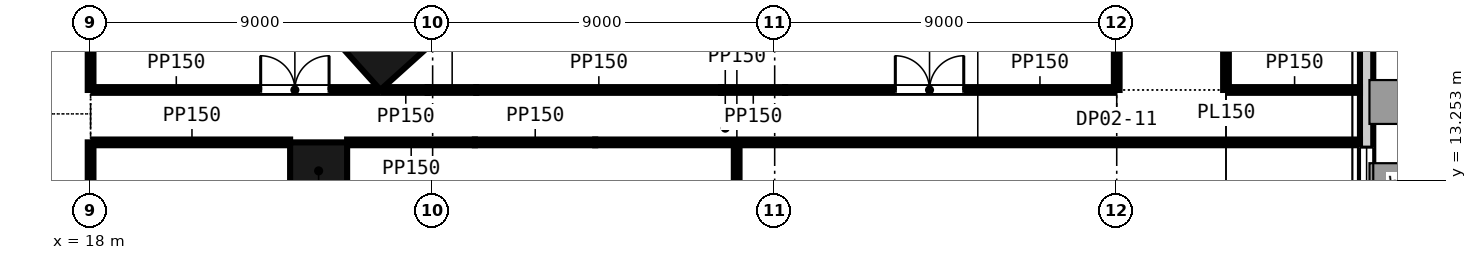
"""IFC4 building model, lengths in metres.
Left out: names, types, materials, properties, quantities, classifications, styles, units other than length and angle.
Written with IfcOpenShell. Run it as: python <this file> out.ifc"""

import sys

from ifc_helpers import new_model, si_unit, direction, frame, frame_2d, origin, origin_2d, place, context, subcontext, project, spatial, rectangle, extrude, element, fill, save


model = new_model("IFC4")
c1 = context("Model", 3, precision=1e-05, world=origin(), true_north=direction((0.0, 1.0)))
c2 = subcontext(c1, "Body", "Model", "MODEL_VIEW")
j1 = project(units=[si_unit("LENGTHUNIT", "METRE"), si_unit("PLANEANGLEUNIT", "RADIAN")], contexts=[c1])
p1 = place(None, origin())
s1 = spatial("IfcSite", under=j1, at=p1, CompositionType="ELEMENT")
p2 = place(p1, origin())
s2 = spatial("IfcBuilding", under=s1, at=p2, CompositionType="ELEMENT")
p3 = place(p2, frame((0.0, 0.0, 18.0)))
s3 = spatial("IfcBuildingStorey", under=s2, at=p3, CompositionType="ELEMENT", Elevation=18.0)
p4 = place(p3, frame((25.691, 16.9, -0.4), z_axis=(0.0, 0.0, 1.0), x_axis=(-0.669130606359, 0.743144825477, 0.0)))
e1 = element("IfcColumn", 1, at=p4, inside=s3, PredefinedType="COLUMN", context=c2, shape_type="SweptSolid", body=[
    extrude(rectangle(XDim=1.8, YDim=1.8, at=origin_2d()), origin(), (0.0, 0.0, 1.0), 4.6),
])
p5 = place(p3, frame((24.0, 13.5, -0.4), z_axis=(0.0, 0.0, 1.0), x_axis=(1.0, 0.0, 0.0)))
e2 = element("IfcColumn", 2, at=p5, inside=s3, PredefinedType="COLUMN", context=c2, shape_type="SweptSolid", body=[
    extrude(rectangle(XDim=1.5, YDim=1.5, at=origin_2d()), origin(), (0.0, 0.0, 1.0), 4.6),
])
p6 = place(p3, frame((51.575, 9.25, -0.4), z_axis=(0.0, 0.0, 1.0), x_axis=(0.0, 1.0, 0.0)))
e3 = element("IfcWall", 3, at=p6, inside=s3, PredefinedType="SOLIDWALL", context=c2, shape_type="SweptSolid", body=[
    extrude(rectangle(XDim=7.75, YDim=0.35, at=frame_2d((3.875, 0.0))), origin(), (0.0, 0.0, 1.0), 3.7),
])
p7 = place(p6, frame((2.875, 0.0, 1.3)))
e4 = element("IfcOpeningElement", 4, at=p7, cuts=e3, PredefinedType="OPENING", context=c2, shape_type="SweptSolid", body=[
    extrude(rectangle(XDim=2.0, YDim=2.35, at=frame_2d((1.0, 1.175))), frame((0.0, 0.185, 0.0), z_axis=(0.0, -1.0, 0.0), x_axis=(1.0, 0.0, 0.0)), (0.0, 0.0, 1.0), 0.37),
])
p8 = place(p3, frame((18.075, 14.25, 0.0), z_axis=(0.0, 0.0, 1.0), x_axis=(1.0, 0.0, 0.0)))
e5 = element("IfcWall", 5, at=p8, inside=s3, PredefinedType="PARTITIONING", context=c2, shape_type="SweptSolid", body=[
    extrude(rectangle(XDim=5.175, YDim=0.15, at=frame_2d((2.587, 0.0))), origin(), (0.0, 0.0, 1.0), 4.2),
])
p9 = place(p3, frame((24.75, 14.25, 0.0), z_axis=(0.0, 0.0, 1.0), x_axis=(1.0, 0.0, 0.0)))
e6 = element("IfcWall", 6, at=p9, inside=s3, PredefinedType="PARTITIONING", context=c2, shape_type="SweptSolid", body=[
    extrude(rectangle(XDim=3.361, YDim=0.15, at=frame_2d((1.681, 0.0))), origin(), (0.0, 0.0, 1.0), 4.2),
])
p10 = place(p3, frame((28.111, 14.25, 0.0), z_axis=(0.0, 0.0, 1.0), x_axis=(1.0, 0.0, 0.0)))
e7 = element("IfcWall", 7, at=p10, inside=s3, PredefinedType="PARTITIONING", context=c2, shape_type="SweptSolid", body=[
    extrude(rectangle(XDim=3.167, YDim=0.15, at=frame_2d((1.583, 0.0))), origin(), (0.0, 0.0, 1.0), 3.2),
])
p11 = place(p3, frame((31.278, 14.25, 0.0), z_axis=(0.0, 0.0, 1.0), x_axis=(1.0, 0.0, 0.0)))
e8 = element("IfcWall", 8, at=p11, inside=s3, PredefinedType="PARTITIONING", context=c2, shape_type="SweptSolid", body=[
    extrude(rectangle(XDim=20.122, YDim=0.15, at=frame_2d((10.061, 0.0))), origin(), (0.0, 0.0, 1.0), 4.2),
])
p12 = place(p3, frame((18.075, 15.629, 0.0), z_axis=(0.0, 0.0, 1.0), x_axis=(1.0, 0.0, 0.0)))
e9 = element("IfcWall", 9, at=p12, inside=s3, PredefinedType="PARTITIONING", context=c2, shape_type="SweptSolid", body=[
    extrude(rectangle(XDim=7.482, YDim=0.15, at=frame_2d((3.741, 0.0))), origin(), (0.0, 0.0, 1.0), 4.2),
])
p13 = place(p12, frame((4.4, 0.0, 0.0)))
e10 = element("IfcOpeningElement", 10, at=p13, cuts=e9, PredefinedType="OPENING", context=c2, shape_type="SweptSolid", body=[
    extrude(rectangle(XDim=1.8, YDim=2.4, at=frame_2d((0.9, 1.2))), frame((0.0, 0.085, 0.0), z_axis=(0.0, -1.0, 0.0), x_axis=(1.0, 0.0, 0.0)), (0.0, 0.0, 1.0), 0.17),
])
p14 = place(p3, frame((25.708, 15.629, 0.0), z_axis=(0.0, 0.0, 1.0), x_axis=(1.0, 0.0, 0.0)))
e11 = element("IfcWall", 11, at=p14, inside=s3, PredefinedType="PARTITIONING", context=c2, shape_type="SweptSolid", body=[
    extrude(rectangle(XDim=1.162, YDim=0.15, at=frame_2d((0.581, 0.0))), origin(), (0.0, 0.0, 1.0), 4.2),
])
p15 = place(p3, frame((26.869, 15.629, 0.0), z_axis=(0.0, 0.0, 1.0), x_axis=(1.0, 0.0, 0.0)))
e12 = element("IfcWall", 12, at=p15, inside=s3, PredefinedType="PARTITIONING", context=c2, shape_type="SweptSolid", body=[
    extrude(rectangle(XDim=1.278, YDim=0.15, at=frame_2d((0.639, 0.0))), origin(), (0.0, 0.0, 1.0), 3.2),
])
p16 = place(p3, frame((28.148, 15.629, 0.0), z_axis=(0.0, 0.0, 1.0), x_axis=(1.0, 0.0, 0.0)))
e13 = element("IfcWall", 13, at=p16, inside=s3, PredefinedType="PARTITIONING", context=c2, shape_type="SweptSolid", body=[
    extrude(rectangle(XDim=6.441, YDim=0.15, at=frame_2d((3.221, 0.0))), origin(), (0.0, 0.0, 1.0), 4.2),
])
p17 = place(p3, frame((34.589, 15.629, 0.0), z_axis=(0.0, 0.0, 1.0), x_axis=(1.0, 0.0, 0.0)))
e14 = element("IfcWall", 14, at=p17, inside=s3, PredefinedType="PARTITIONING", context=c2, shape_type="SweptSolid", body=[
    extrude(rectangle(XDim=1.685, YDim=0.15, at=frame_2d((0.843, 0.0))), origin(), (0.0, 0.0, 1.0), 3.219),
])
p18 = place(p3, frame((36.274, 15.629, 0.0), z_axis=(0.0, 0.0, 1.0), x_axis=(1.0, 0.0, 0.0)))
e15 = element("IfcWall", 15, at=p18, inside=s3, PredefinedType="PARTITIONING", context=c2, shape_type="SweptSolid", body=[
    extrude(rectangle(XDim=8.651, YDim=0.15, at=frame_2d((4.325, 0.0))), origin(), (0.0, 0.0, 1.0), 4.2),
])
p19 = place(p18, frame((2.9, 0.0, 0.0)))
e16 = element("IfcOpeningElement", 16, at=p19, cuts=e15, PredefinedType="OPENING", context=c2, shape_type="SweptSolid", body=[
    extrude(rectangle(XDim=1.8, YDim=2.4, at=frame_2d((0.9, 1.2))), frame((0.0, 0.085, 0.0), z_axis=(0.0, -1.0, 0.0), x_axis=(1.0, 0.0, 0.0)), (0.0, 0.0, 1.0), 0.17),
])
p20 = place(p3, frame((47.95, 15.629, 0.0), z_axis=(0.0, 0.0, 1.0), x_axis=(1.0, 0.0, 0.0)))
e17 = element("IfcWall", 17, at=p20, inside=s3, PredefinedType="PARTITIONING", context=c2, shape_type="SweptSolid", body=[
    extrude(rectangle(XDim=3.45, YDim=0.15, at=frame_2d((1.725, 0.0))), origin(), (0.0, 0.0, 1.0), 4.2),
])
p21 = place(p3, frame((18.0, 0.0, 0.0), z_axis=(0.0, 0.0, 1.0), x_axis=(0.0, 1.0, 0.0)))
e18 = element("IfcWall", 18, at=p21, inside=s3, PredefinedType="PARTITIONING", context=c2, shape_type="SweptSolid", body=[
    extrude(rectangle(XDim=14.25, YDim=0.15, at=frame_2d((7.125, 0.0))), origin(), (0.0, 0.0, 1.0), 4.2),
])
p22 = place(p3, frame((18.0, 15.629, 0.0), z_axis=(0.0, 0.0, 1.0), x_axis=(0.0, 1.0, 0.0)))
e19 = element("IfcWall", 19, at=p22, inside=s3, PredefinedType="PARTITIONING", context=c2, shape_type="SweptSolid", body=[
    extrude(rectangle(XDim=9.85, YDim=0.15, at=frame_2d((4.925, 0.0))), origin(), (0.0, 0.0, 1.0), 4.2),
])
p23 = place(p3, frame((35.0, 8.019, 0.0), z_axis=(0.0, 0.0, 1.0), x_axis=(0.0, 1.0, 0.0)))
e20 = element("IfcWall", 20, at=p23, inside=s3, PredefinedType="PARTITIONING", context=c2, shape_type="SweptSolid", body=[
    extrude(rectangle(XDim=6.156, YDim=0.15, at=frame_2d((3.078, 0.0))), origin(), (0.0, 0.0, 1.0), 4.2),
])
p24 = place(p3, frame((45.0, 15.629, 0.0), z_axis=(0.0, 0.0, 1.0), x_axis=(0.0, 1.0, 0.0)))
e21 = element("IfcWall", 21, at=p24, inside=s3, PredefinedType="PARTITIONING", context=c2, shape_type="SweptSolid", body=[
    extrude(rectangle(XDim=11.614, YDim=0.15, at=frame_2d((5.807, 0.0))), origin(), (0.0, 0.0, 1.0), 4.2),
])
p25 = place(p24, frame((7.521, 0.0, 0.0)))
e22 = element("IfcOpeningElement", 22, at=p25, cuts=e21, PredefinedType="OPENING", context=c2, shape_type="SweptSolid", body=[
    extrude(rectangle(XDim=1.8, YDim=2.4, at=frame_2d((0.9, 1.2))), frame((0.0, 0.085, 0.0), z_axis=(0.0, -1.0, 0.0), x_axis=(1.0, 0.0, 0.0)), (0.0, 0.0, 1.0), 0.17),
])
p26 = place(p3, frame((47.875, 15.629, 0.0), z_axis=(0.0, 0.0, 1.0), x_axis=(0.0, 1.0, 0.0)))
e23 = element("IfcWall", 23, at=p26, inside=s3, PredefinedType="PARTITIONING", context=c2, shape_type="SweptSolid", body=[
    extrude(rectangle(XDim=11.071, YDim=0.15, at=frame_2d((5.535, 0.0))), origin(), (0.0, 0.0, 1.0), 4.2),
])
p27 = place(p26, frame((6.021, 0.0, 0.0)))
e24 = element("IfcOpeningElement", 24, at=p27, cuts=e23, PredefinedType="OPENING", context=c2, shape_type="SweptSolid", body=[
    extrude(rectangle(XDim=0.9, YDim=2.1, at=frame_2d((0.45, 1.05))), frame((0.0, 0.085, 0.0), z_axis=(0.0, -1.0, 0.0), x_axis=(1.0, 0.0, 0.0)), (0.0, 0.0, 1.0), 0.17),
])
p28 = place(p7, origin())
e25 = element("IfcWindow", 25, at=p28, inside=s3, PartitioningType="SINGLE_PANEL", PredefinedType="WINDOW", context=c2, shape_type="SweptSolid", body=[
    extrude(rectangle(XDim=2.0, YDim=2.35, at=frame_2d((1.0, 1.175))), frame((0.0, 0.03, 0.0), z_axis=(0.0, -1.0, 0.0), x_axis=(1.0, 0.0, 0.0)), (0.0, 0.0, 1.0), 0.06),
])
fill(e4, e25)
p29 = place(p13, origin())
e26 = element("IfcDoor", 26, at=p29, inside=s3, OperationType="SINGLE_SWING_LEFT", PredefinedType="DOOR", context=c2, shape_type="SweptSolid", body=[
    extrude(rectangle(XDim=1.8, YDim=2.4, at=frame_2d((0.9, 1.2))), frame((0.0, 0.025, 0.0), z_axis=(0.0, -1.0, 0.0), x_axis=(1.0, 0.0, 0.0)), (0.0, 0.0, 1.0), 0.05),
])
fill(e10, e26)
p30 = place(p19, origin())
e27 = element("IfcDoor", 27, at=p30, inside=s3, OperationType="SINGLE_SWING_LEFT", PredefinedType="DOOR", context=c2, shape_type="SweptSolid", body=[
    extrude(rectangle(XDim=1.8, YDim=2.4, at=frame_2d((0.9, 1.2))), frame((0.0, 0.025, 0.0), z_axis=(0.0, -1.0, 0.0), x_axis=(1.0, 0.0, 0.0)), (0.0, 0.0, 1.0), 0.05),
])
fill(e16, e27)
save(model, sys.argv[1])
